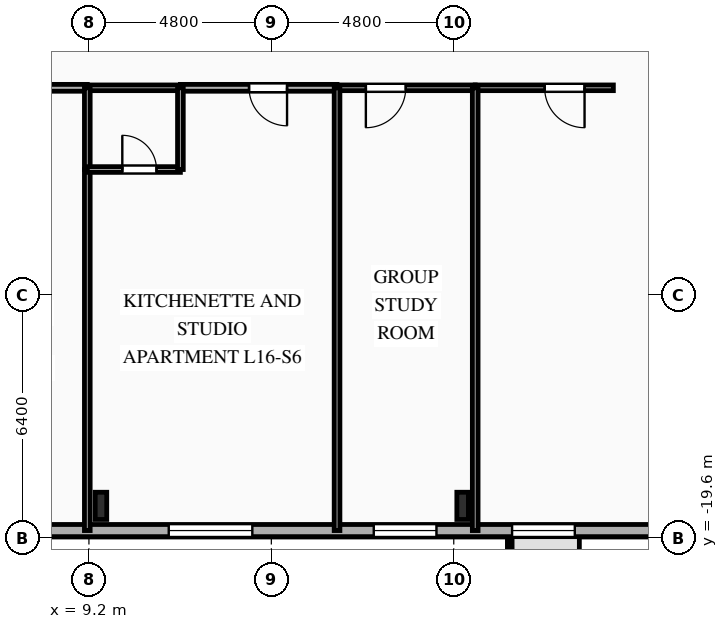
"""IFC4 building model, lengths in metres.
Left out: names, types, materials, properties, quantities, classifications, styles, units other than length and angle.
Written with IfcOpenShell. Run it as: python <this file> out.ifc"""

import sys

from ifc_helpers import new_model, si_unit, direction, frame, frame_2d, origin, origin_2d, place, context, subcontext, project, spatial, rectangle, i_section, extrude, element, fill, save


model = new_model("IFC4")
c1 = context("Model", 3, precision=1e-05, world=origin(), true_north=direction((0.0, 1.0)))
c2 = subcontext(c1, "Body", "Model", "MODEL_VIEW")
j1 = project(units=[si_unit("LENGTHUNIT", "METRE"), si_unit("PLANEANGLEUNIT", "RADIAN")], contexts=[c1])
p1 = place(None, origin())
s1 = spatial("IfcSite", under=j1, at=p1, CompositionType="ELEMENT")
p2 = place(p1, origin())
s2 = spatial("IfcBuilding", under=s1, at=p2, CompositionType="ELEMENT")
p3 = place(p2, frame((0.0, 0.0, 60.5)))
s3 = spatial("IfcBuildingStorey", under=s2, at=p3, CompositionType="ELEMENT", Elevation=60.5)
for number, where, z_axis, x_axis in (
    (1, (9.517, -18.75, 0.0), (0.0, 0.0, 1.0), (1.0, 0.0, 0.0)),
    (2, (19.033, -18.75, 0.0), (0.0, 0.0, 1.0), (1.0, 0.0, 0.0)),
):
    element("IfcColumn", number, at=place(p3, frame(where, z_axis=z_axis, x_axis=x_axis)), inside=s3, PredefinedType="COLUMN", context=c2, shape_type="SweptSolid", body=[
        extrude(i_section(OverallWidth=0.304, OverallDepth=0.716, WebThickness=0.021, FlangeThickness=0.04, FilletRadius=0.027, at=origin_2d()), origin(), (0.0, 0.0, 1.0), 3.35),
    ])
p4 = place(p3, frame((29.2, -19.4, 0.0), z_axis=(0.0, 0.0, 1.0), x_axis=(-1.0, 0.0, 0.0)))
e3 = element("IfcWall", 3, at=p4, inside=s3, PredefinedType="SOLIDWALL", context=c2, shape_type="SweptSolid", body=[
    extrude(rectangle(XDim=58.4, YDim=0.32, at=frame_2d((29.2, 0.0))), origin(), (0.0, 0.0, 1.0), 3.035),
])
p5 = place(p4, frame((7.215, 0.0, 0.85)))
e4 = element("IfcOpeningElement", 4, at=p5, cuts=e3, PredefinedType="OPENING", context=c2, shape_type="SweptSolid", body=[
    extrude(rectangle(XDim=1.65, YDim=1.85, at=frame_2d((0.825, 0.925))), frame((0.0, 0.17, 0.0), z_axis=(0.0, -1.0, 0.0), x_axis=(1.0, 0.0, 0.0)), (0.0, 0.0, 1.0), 0.34),
])
p6 = place(p4, frame((10.855, 0.0, 0.85)))
e5 = element("IfcOpeningElement", 5, at=p6, cuts=e3, PredefinedType="OPENING", context=c2, shape_type="SweptSolid", body=[
    extrude(rectangle(XDim=1.65, YDim=1.85, at=frame_2d((0.825, 0.925))), frame((0.0, 0.17, 0.0), z_axis=(0.0, -1.0, 0.0), x_axis=(1.0, 0.0, 0.0)), (0.0, 0.0, 1.0), 0.34),
])
p7 = place(p4, frame((15.7, 0.0, 0.85)))
e6 = element("IfcOpeningElement", 6, at=p7, cuts=e3, PredefinedType="OPENING", context=c2, shape_type="SweptSolid", body=[
    extrude(rectangle(XDim=2.2, YDim=1.85, at=frame_2d((1.1, 0.925))), frame((0.0, 0.17, 0.0), z_axis=(0.0, -1.0, 0.0), x_axis=(1.0, 0.0, 0.0)), (0.0, 0.0, 1.0), 0.34),
])
p8 = place(p4, frame((22.26, 0.0, 0.85)))
e7 = element("IfcOpeningElement", 7, at=p8, cuts=e3, PredefinedType="OPENING", context=c2, shape_type="SweptSolid", body=[
    extrude(rectangle(XDim=2.2, YDim=1.85, at=frame_2d((1.1, 0.925))), frame((0.0, 0.17, 0.0), z_axis=(0.0, -1.0, 0.0), x_axis=(1.0, 0.0, 0.0)), (0.0, 0.0, 1.0), 0.34),
])
p9 = place(p4, frame((29.408, 0.0, 0.85)))
e8 = element("IfcOpeningElement", 8, at=p9, cuts=e3, PredefinedType="OPENING", context=c2, shape_type="SweptSolid", body=[
    extrude(rectangle(XDim=2.2, YDim=1.85, at=frame_2d((1.1, 0.925))), frame((0.0, 0.17, 0.0), z_axis=(0.0, -1.0, 0.0), x_axis=(1.0, 0.0, 0.0)), (0.0, 0.0, 1.0), 0.34),
])
p10 = place(p4, frame((35.38, 0.0, 0.85)))
e9 = element("IfcOpeningElement", 9, at=p10, cuts=e3, PredefinedType="OPENING", context=c2, shape_type="SweptSolid", body=[
    extrude(rectangle(XDim=2.2, YDim=1.85, at=frame_2d((1.1, 0.925))), frame((0.0, 0.17, 0.0), z_axis=(0.0, -1.0, 0.0), x_axis=(1.0, 0.0, 0.0)), (0.0, 0.0, 1.0), 0.34),
])
p11 = place(p4, frame((41.98, 0.0, 0.85)))
e10 = element("IfcOpeningElement", 10, at=p11, cuts=e3, PredefinedType="OPENING", context=c2, shape_type="SweptSolid", body=[
    extrude(rectangle(XDim=2.2, YDim=1.85, at=frame_2d((1.1, 0.925))), frame((0.0, 0.17, 0.0), z_axis=(0.0, -1.0, 0.0), x_axis=(1.0, 0.0, 0.0)), (0.0, 0.0, 1.0), 0.34),
])
p12 = place(p4, frame((48.495, 0.0, 0.85)))
e11 = element("IfcOpeningElement", 11, at=p12, cuts=e3, PredefinedType="OPENING", context=c2, shape_type="SweptSolid", body=[
    extrude(rectangle(XDim=1.65, YDim=1.85, at=frame_2d((0.825, 0.925))), frame((0.0, 0.17, 0.0), z_axis=(0.0, -1.0, 0.0), x_axis=(1.0, 0.0, 0.0)), (0.0, 0.0, 1.0), 0.34),
])
p13 = place(p3, frame((9.157, -7.75, 0.0), z_axis=(0.0, 0.0, 1.0), x_axis=(-1.0, 0.0, 0.0)))
e12 = element("IfcWall", 12, at=p13, inside=s3, PredefinedType="PARTITIONING", context=c2, shape_type="SweptSolid", body=[
    extrude(rectangle(XDim=4.121, YDim=0.18, at=frame_2d((2.061, 0.0))), origin(), (0.0, 0.0, 1.0), 3.035),
])
p14 = place(p13, frame((2.296, 0.0, 0.0)))
e13 = element("IfcOpeningElement", 13, at=p14, cuts=e12, PredefinedType="OPENING", context=c2, shape_type="SweptSolid", body=[
    extrude(rectangle(XDim=1.0, YDim=2.15, at=frame_2d((0.5, 1.075))), frame((0.0, 0.1, 0.0), z_axis=(0.0, -1.0, 0.0), x_axis=(1.0, 0.0, 0.0)), (0.0, 0.0, 1.0), 0.2),
])
p15 = place(p3, frame((15.729, -7.75, 0.0), z_axis=(0.0, 0.0, 1.0), x_axis=(-1.0, 0.0, 0.0)))
e14 = element("IfcWall", 14, at=p15, inside=s3, PredefinedType="PARTITIONING", context=c2, shape_type="SweptSolid", body=[
    extrude(rectangle(XDim=4.122, YDim=0.18, at=frame_2d((2.061, 0.0))), origin(), (0.0, 0.0, 1.0), 3.035),
])
p16 = place(p15, frame((1.316, 0.0, 0.0)))
e15 = element("IfcOpeningElement", 15, at=p16, cuts=e14, PredefinedType="OPENING", context=c2, shape_type="SweptSolid", body=[
    extrude(rectangle(XDim=1.0, YDim=2.15, at=frame_2d((0.5, 1.075))), frame((0.0, 0.1, 0.0), z_axis=(0.0, -1.0, 0.0), x_axis=(1.0, 0.0, 0.0)), (0.0, 0.0, 1.0), 0.2),
])
p17 = place(p3, frame((11.607, -7.75, 0.0), z_axis=(0.0, 0.0, 1.0), x_axis=(-1.0, 0.0, 0.0)))
e16 = element("IfcWall", 16, at=p17, inside=s3, PredefinedType="PLUMBINGWALL", context=c2, shape_type="SweptSolid", body=[
    extrude(rectangle(XDim=2.45, YDim=0.15, at=frame_2d((1.225, 0.0))), origin(), (0.0, 0.0, 1.0), 3.035),
])
p18 = place(p3, frame((19.365, -7.75, 0.0), z_axis=(0.0, 0.0, 1.0), x_axis=(-1.0, 0.0, 0.0)))
e17 = element("IfcWall", 17, at=p18, inside=s3, PredefinedType="PARTITIONING", context=c2, shape_type="SweptSolid", body=[
    extrude(rectangle(XDim=3.635, YDim=0.15, at=frame_2d((1.818, 0.0))), origin(), (0.0, 0.0, 1.0), 3.035),
])
p19 = place(p18, frame((1.827, 0.0, 0.0)))
e18 = element("IfcOpeningElement", 18, at=p19, cuts=e17, PredefinedType="OPENING", context=c2, shape_type="SweptSolid", body=[
    extrude(rectangle(XDim=1.05, YDim=2.15, at=frame_2d((0.525, 1.075))), frame((0.0, 0.085, 0.0), z_axis=(0.0, -1.0, 0.0), x_axis=(1.0, 0.0, 0.0)), (0.0, 0.0, 1.0), 0.17),
])
p20 = place(p3, frame((23.0, -7.75, 0.0), z_axis=(0.0, 0.0, 1.0), x_axis=(-1.0, 0.0, 0.0)))
e19 = element("IfcWall", 19, at=p20, inside=s3, PredefinedType="PARTITIONING", context=c2, shape_type="SweptSolid", body=[
    extrude(rectangle(XDim=3.635, YDim=0.15, at=frame_2d((1.818, 0.0))), origin(), (0.0, 0.0, 1.0), 3.035),
])
p21 = place(p20, frame((0.758, 0.0, 0.0)))
e20 = element("IfcOpeningElement", 20, at=p21, cuts=e19, PredefinedType="OPENING", context=c2, shape_type="SweptSolid", body=[
    extrude(rectangle(XDim=1.05, YDim=2.15, at=frame_2d((0.525, 1.075))), frame((0.0, 0.085, 0.0), z_axis=(0.0, -1.0, 0.0), x_axis=(1.0, 0.0, 0.0)), (0.0, 0.0, 1.0), 0.17),
])
p22 = place(p3, frame((9.157, -9.9, 0.0), z_axis=(0.0, 0.0, 1.0), x_axis=(0.0, -1.0, 0.0)))
e21 = element("IfcWall", 21, at=p22, inside=s3, PredefinedType="PARTITIONING", context=c2, shape_type="SweptSolid", body=[
    extrude(rectangle(XDim=9.5, YDim=0.15, at=frame_2d((4.75, 0.0))), origin(), (0.0, 0.0, 1.0), 2.52),
])
p23 = place(p3, frame((9.157, -7.75, 0.0), z_axis=(0.0, 0.0, 1.0), x_axis=(0.0, -1.0, 0.0)))
e22 = element("IfcWall", 22, at=p23, inside=s3, PredefinedType="PLUMBINGWALL", context=c2, shape_type="SweptSolid", body=[
    extrude(rectangle(XDim=2.15, YDim=0.15, at=frame_2d((1.075, 0.0))), origin(), (0.0, 0.0, 1.0), 2.52),
])
p24 = place(p3, frame((9.157, -9.9, 0.0), z_axis=(0.0, 0.0, 1.0), x_axis=(1.0, 0.0, 0.0)))
e23 = element("IfcWall", 23, at=p24, inside=s3, PredefinedType="PLUMBINGWALL", context=c2, shape_type="SweptSolid", body=[
    extrude(rectangle(XDim=2.45, YDim=0.15, at=frame_2d((1.225, 0.0))), origin(), (0.0, 0.0, 1.0), 3.035),
])
p25 = place(p24, frame((0.921, 0.0, 0.0)))
e24 = element("IfcOpeningElement", 24, at=p25, cuts=e23, PredefinedType="OPENING", context=c2, shape_type="SweptSolid", body=[
    extrude(rectangle(XDim=0.9, YDim=2.1, at=frame_2d((0.45, 1.05))), frame((0.0, 0.085, 0.0), z_axis=(0.0, -1.0, 0.0), x_axis=(1.0, 0.0, 0.0)), (0.0, 0.0, 1.0), 0.17),
])
p26 = place(p3, frame((11.607, -9.9, 0.0), z_axis=(0.0, 0.0, 1.0), x_axis=(0.0, 1.0, 0.0)))
e25 = element("IfcWall", 25, at=p26, inside=s3, PredefinedType="PLUMBINGWALL", context=c2, shape_type="SweptSolid", body=[
    extrude(rectangle(XDim=2.15, YDim=0.15, at=frame_2d((1.075, 0.0))), origin(), (0.0, 0.0, 1.0), 3.035),
])
for number, where, z_axis, x_axis in (
    (26, (15.729, -7.75, 0.0), (0.0, 0.0, 1.0), (0.0, -1.0, 0.0)),
    (27, (19.365, -7.75, 0.0), (0.0, 0.0, 1.0), (0.0, -1.0, 0.0)),
):
    element("IfcWall", number, at=place(p3, frame(where, z_axis=z_axis, x_axis=x_axis)), inside=s3, PredefinedType="PARTITIONING", context=c2, shape_type="SweptSolid", body=[
        extrude(rectangle(XDim=11.65, YDim=0.15, at=frame_2d((5.825, 0.0))), origin(), (0.0, 0.0, 1.0), 3.035),
    ])
p27 = place(p5, origin())
e28 = element("IfcWindow", 28, at=p27, inside=s3, PartitioningType="SINGLE_PANEL", PredefinedType="WINDOW", context=c2, shape_type="SweptSolid", body=[
    extrude(rectangle(XDim=1.65, YDim=1.85, at=frame_2d((0.825, 0.925))), frame((0.0, 0.03, 0.0), z_axis=(0.0, -1.0, 0.0), x_axis=(1.0, 0.0, 0.0)), (0.0, 0.0, 1.0), 0.06),
])
fill(e4, e28)
p28 = place(p6, origin())
e29 = element("IfcWindow", 29, at=p28, inside=s3, PartitioningType="SINGLE_PANEL", PredefinedType="WINDOW", context=c2, shape_type="SweptSolid", body=[
    extrude(rectangle(XDim=1.65, YDim=1.85, at=frame_2d((0.825, 0.925))), frame((0.0, 0.03, 0.0), z_axis=(0.0, -1.0, 0.0), x_axis=(1.0, 0.0, 0.0)), (0.0, 0.0, 1.0), 0.06),
])
fill(e5, e29)
p29 = place(p7, origin())
e30 = element("IfcWindow", 30, at=p29, inside=s3, PartitioningType="SINGLE_PANEL", PredefinedType="WINDOW", context=c2, shape_type="SweptSolid", body=[
    extrude(rectangle(XDim=2.2, YDim=1.85, at=frame_2d((1.1, 0.925))), frame((0.0, 0.03, 0.0), z_axis=(0.0, -1.0, 0.0), x_axis=(1.0, 0.0, 0.0)), (0.0, 0.0, 1.0), 0.06),
])
fill(e6, e30)
p30 = place(p16, origin())
e31 = element("IfcDoor", 31, at=p30, inside=s3, OperationType="SINGLE_SWING_LEFT", PredefinedType="DOOR", context=c2, shape_type="SweptSolid", body=[
    extrude(rectangle(XDim=1.0, YDim=2.15, at=frame_2d((0.5, 1.075))), frame((0.0, 0.025, 0.0), z_axis=(0.0, -1.0, 0.0), x_axis=(1.0, 0.0, 0.0)), (0.0, 0.0, 1.0), 0.05),
])
fill(e15, e31)
p31 = place(p19, origin())
e32 = element("IfcDoor", 32, at=p31, inside=s3, OperationType="SINGLE_SWING_RIGHT", PredefinedType="DOOR", context=c2, shape_type="SweptSolid", body=[
    extrude(rectangle(XDim=1.05, YDim=2.15, at=frame_2d((0.525, 1.075))), frame((0.0, 0.025, 0.0), z_axis=(0.0, -1.0, 0.0), x_axis=(1.0, 0.0, 0.0)), (0.0, 0.0, 1.0), 0.05),
])
fill(e18, e32)
p32 = place(p21, origin())
e33 = element("IfcDoor", 33, at=p32, inside=s3, OperationType="SINGLE_SWING_LEFT", PredefinedType="DOOR", context=c2, shape_type="SweptSolid", body=[
    extrude(rectangle(XDim=1.05, YDim=2.15, at=frame_2d((0.525, 1.075))), frame((0.0, 0.025, 0.0), z_axis=(0.0, -1.0, 0.0), x_axis=(1.0, 0.0, 0.0)), (0.0, 0.0, 1.0), 0.05),
])
fill(e20, e33)
p33 = place(p25, origin())
e34 = element("IfcDoor", 34, at=p33, inside=s3, OperationType="SINGLE_SWING_LEFT", PredefinedType="DOOR", context=c2, shape_type="SweptSolid", body=[
    extrude(rectangle(XDim=0.9, YDim=2.1, at=frame_2d((0.45, 1.05))), frame((0.0, 0.025, 0.0), z_axis=(0.0, -1.0, 0.0), x_axis=(1.0, 0.0, 0.0)), (0.0, 0.0, 1.0), 0.05),
])
fill(e24, e34)
save(model, sys.argv[1])
